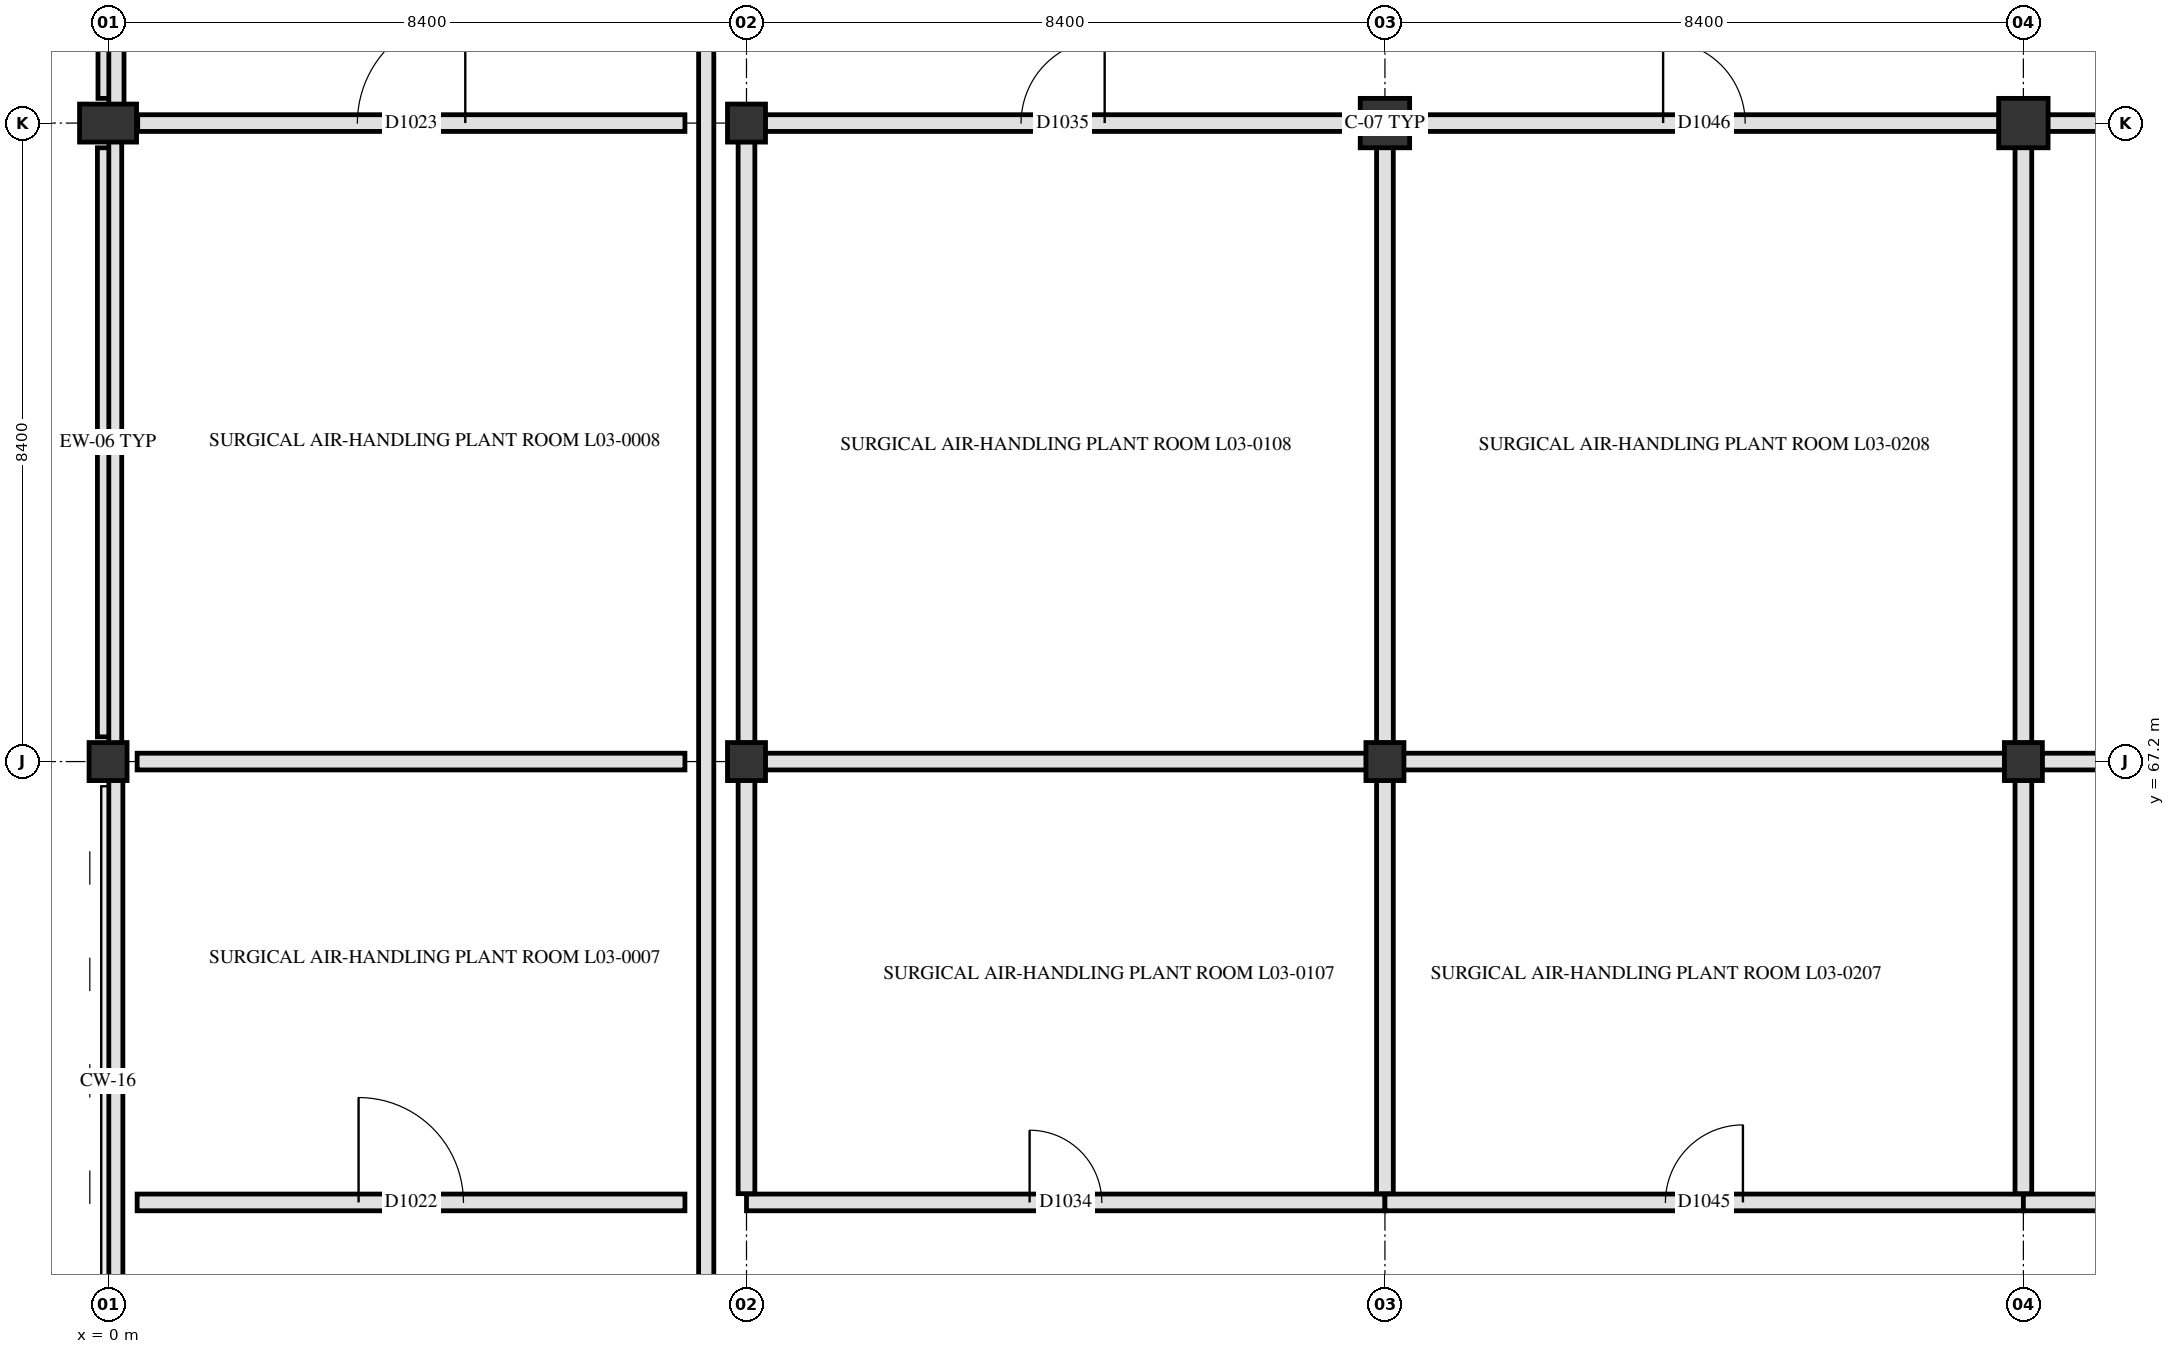
"""IFC4 building model, lengths in metres.
Left out: names, types, materials, properties, quantities, classifications, styles, units other than length and angle.
Written with IfcOpenShell. Run it as: python <this file> out.ifc"""

import sys

from ifc_helpers import new_model, si_unit, direction, frame, frame_2d, origin, origin_2d, place, context, subcontext, project, spatial, rectangle, circle, extrude, element, fill, save


model = new_model("IFC4")
c1 = context("Model", 3, precision=1e-05, world=origin(), true_north=direction((0.0, 1.0)))
c2 = subcontext(c1, "Body", "Model", "MODEL_VIEW")
j1 = project(units=[si_unit("LENGTHUNIT", "METRE"), si_unit("PLANEANGLEUNIT", "RADIAN")], contexts=[c1])
p1 = place(None, origin())
s1 = spatial("IfcSite", under=j1, at=p1, CompositionType="ELEMENT")
p2 = place(p1, origin())
s2 = spatial("IfcBuilding", under=s1, at=p2, CompositionType="ELEMENT")
p3 = place(p2, frame((0.0, 0.0, 14.4)))
s3 = spatial("IfcBuildingStorey", under=s2, at=p3, CompositionType="ELEMENT", Elevation=14.4)
p4 = place(p3, frame((0.0, 67.2, 0.0), z_axis=(0.0, 0.0, 1.0), x_axis=(1.0, 0.0, 0.0)))
e1 = element("IfcColumn", 1, at=p4, inside=s3, PredefinedType="COLUMN", context=c2, shape_type="SweptSolid", body=[
    extrude(rectangle(XDim=0.5, YDim=0.5, at=origin_2d()), origin(), (0.0, 0.0, 1.0), 4.2),
])
p5 = place(p3, frame((0.0, 75.6, 0.0), z_axis=(0.0, 0.0, 1.0), x_axis=(0.0, 1.0, 0.0)))
e2 = element("IfcColumn", 2, at=p5, inside=s3, PredefinedType="PILASTER", context=c2, shape_type="SweptSolid", body=[
    extrude(rectangle(XDim=0.5, YDim=0.75, at=origin_2d()), origin(), (0.0, 0.0, 1.0), 4.2),
])
for number, where, z_axis, x_axis in (
    (3, (8.4, 67.2, 0.0), (0.0, 0.0, 1.0), (1.0, 0.0, 0.0)),
    (4, (8.4, 75.6, 0.0), (0.0, 0.0, 1.0), (1.0, 0.0, 0.0)),
    (5, (16.8, 67.2, 0.0), (0.0, 0.0, 1.0), (1.0, 0.0, 0.0)),
):
    element("IfcColumn", number, at=place(p3, frame(where, z_axis=z_axis, x_axis=x_axis)), inside=s3, PredefinedType="COLUMN", context=c2, shape_type="SweptSolid", body=[
        extrude(rectangle(XDim=0.5, YDim=0.5, at=origin_2d()), origin(), (0.0, 0.0, 1.0), 4.2),
    ])
p6 = place(p3, frame((16.8, 75.6, 0.0), z_axis=(0.0, 0.0, 1.0), x_axis=(1.0, 0.0, 0.0)))
e6 = element("IfcColumn", 6, at=p6, inside=s3, PredefinedType="COLUMN", context=c2, shape_type="SweptSolid", body=[
    extrude(circle(Radius=0.325, at=origin_2d()), origin(), (0.0, 0.0, 1.0), 4.2),
])
p7 = place(p3, frame((25.2, 67.2, 0.0), z_axis=(0.0, 0.0, 1.0), x_axis=(1.0, 0.0, 0.0)))
e7 = element("IfcColumn", 7, at=p7, inside=s3, PredefinedType="COLUMN", context=c2, shape_type="SweptSolid", body=[
    extrude(rectangle(XDim=0.5, YDim=0.5, at=origin_2d()), origin(), (0.0, 0.0, 1.0), 4.2),
])
p8 = place(p3, frame((25.2, 75.6, 0.0), z_axis=(0.0, 0.0, 1.0), x_axis=(1.0, 0.0, 0.0)))
e8 = element("IfcColumn", 8, at=p8, inside=s3, PredefinedType="COLUMN", context=c2, shape_type="SweptSolid", body=[
    extrude(circle(Radius=0.325, at=origin_2d()), origin(), (0.0, 0.0, 1.0), 4.2),
])
p9 = place(p3, frame((0.0, 67.525, 0.0), z_axis=(0.0, 0.0, 1.0), x_axis=(0.0, 1.0, 0.0)))
e9 = element("IfcWall", 9, at=p9, inside=s3, PredefinedType="SOLIDWALL", context=c2, shape_type="SweptSolid", body=[
    extrude(rectangle(XDim=7.75, YDim=0.28, at=frame_2d((3.875, 0.0))), origin(), (0.0, 0.0, 1.0), 3.19),
])
p10 = place(p3, frame((0.0, 75.925, 0.0), z_axis=(0.0, 0.0, 1.0), x_axis=(0.0, 1.0, 0.0)))
e10 = element("IfcWall", 10, at=p10, inside=s3, PredefinedType="SOLIDWALL", context=c2, shape_type="SweptSolid", body=[
    extrude(rectangle(XDim=7.75, YDim=0.265, at=frame_2d((3.875, 0.0))), origin(), (0.0, 0.0, 1.0), 3.19),
])
p11 = place(p10, frame((0.938, 0.0, 0.85)))
e11 = element("IfcOpeningElement", 11, at=p11, cuts=e10, PredefinedType="OPENING", context=c2, shape_type="SweptSolid", body=[
    extrude(rectangle(XDim=2.0, YDim=1.66, at=frame_2d((1.0, 0.83))), frame((0.0, 0.142, 0.0), z_axis=(0.0, -1.0, 0.0), x_axis=(1.0, 0.0, 0.0)), (0.0, 0.0, 1.0), 0.285),
])
p12 = place(p10, frame((5.238, 0.0, 0.85)))
e12 = element("IfcOpeningElement", 12, at=p12, cuts=e10, PredefinedType="OPENING", context=c2, shape_type="SweptSolid", body=[
    extrude(rectangle(XDim=1.15, YDim=1.78, at=frame_2d((0.575, 0.89))), frame((0.0, 0.142, 0.0), z_axis=(0.0, -1.0, 0.0), x_axis=(1.0, 0.0, 0.0)), (0.0, 0.0, 1.0), 0.285),
])
p13 = place(p3, frame((7.87, 109.2, 4.18), z_axis=(0.0, 0.0, 1.0), x_axis=(0.0, -1.0, 0.0)))
e13 = element("IfcWall", 13, at=p13, inside=s3, PredefinedType="PARAPET", context=c2, shape_type="SweptSolid", body=[
    extrude(rectangle(XDim=50.4, YDim=0.2, at=frame_2d((25.2, 0.0))), origin(), (0.0, 0.0, 1.0), 1.17),
])
p14 = place(p3, frame((0.103, 58.8, 4.18), z_axis=(0.0, 0.0, 1.0), x_axis=(0.0, 1.0, 0.0)))
e14 = element("IfcWall", 14, at=p14, inside=s3, PredefinedType="PARAPET", context=c2, shape_type="SweptSolid", body=[
    extrude(rectangle(XDim=8.4, YDim=0.185, at=frame_2d((4.2, 0.0))), origin(), (0.0, 0.0, 1.0), 1.17),
])
p15 = place(p3, frame((0.095, 67.2, 4.18), z_axis=(0.0, 0.0, 1.0), x_axis=(0.0, 1.0, 0.0)))
e15 = element("IfcWall", 15, at=p15, inside=s3, PredefinedType="PARAPET", context=c2, shape_type="SweptSolid", body=[
    extrude(rectangle(XDim=8.4, YDim=0.17, at=frame_2d((4.2, 0.0))), origin(), (0.0, 0.0, 1.0), 1.17),
])
p16 = place(p3, frame((0.11, 75.6, 4.18), z_axis=(0.0, 0.0, 1.0), x_axis=(0.0, 1.0, 0.0)))
e16 = element("IfcWall", 16, at=p16, inside=s3, PredefinedType="PARAPET", context=c2, shape_type="SweptSolid", body=[
    extrude(rectangle(XDim=8.4, YDim=0.2, at=frame_2d((4.2, 0.0))), origin(), (0.0, 0.0, 1.0), 1.17),
])
p17 = place(p3, frame((0.383, 61.4, 0.0), z_axis=(0.0, 0.0, 1.0), x_axis=(1.0, 0.0, 0.0)))
e17 = element("IfcWall", 17, at=p17, inside=s3, PredefinedType="PARTITIONING", context=c2, shape_type="SweptSolid", body=[
    extrude(rectangle(XDim=7.208, YDim=0.22, at=frame_2d((3.604, 0.0))), origin(), (0.0, 0.0, 1.0), 3.89),
])
p18 = place(p17, frame((2.914, 0.0, 0.0)))
e18 = element("IfcOpeningElement", 18, at=p18, cuts=e17, PredefinedType="OPENING", context=c2, shape_type="SweptSolid", body=[
    extrude(rectangle(XDim=1.38, YDim=2.22, at=frame_2d((0.69, 1.11))), frame((0.0, 0.12, 0.0), z_axis=(0.0, -1.0, 0.0), x_axis=(1.0, 0.0, 0.0)), (0.0, 0.0, 1.0), 0.24),
])
p19 = place(p3, frame((8.4, 61.4, 0.0), z_axis=(0.0, 0.0, 1.0), x_axis=(1.0, 0.0, 0.0)))
e19 = element("IfcWall", 19, at=p19, inside=s3, PredefinedType="PARTITIONING", context=c2, shape_type="SweptSolid", body=[
    extrude(rectangle(XDim=8.4, YDim=0.22, at=frame_2d((4.2, 0.0))), origin(), (0.0, 0.0, 1.0), 3.33),
])
p20 = place(p19, frame((3.725, 0.0, 0.0)))
e20 = element("IfcOpeningElement", 20, at=p20, cuts=e19, PredefinedType="OPENING", context=c2, shape_type="SweptSolid", body=[
    extrude(rectangle(XDim=0.95, YDim=2.1, at=frame_2d((0.475, 1.05))), frame((0.0, 0.12, 0.0), z_axis=(0.0, -1.0, 0.0), x_axis=(1.0, 0.0, 0.0)), (0.0, 0.0, 1.0), 0.24),
])
p21 = place(p3, frame((16.8, 61.4, 0.0), z_axis=(0.0, 0.0, 1.0), x_axis=(1.0, 0.0, 0.0)))
e21 = element("IfcWall", 21, at=p21, inside=s3, PredefinedType="PARTITIONING", context=c2, shape_type="SweptSolid", body=[
    extrude(rectangle(XDim=8.4, YDim=0.22, at=frame_2d((4.2, 0.0))), origin(), (0.0, 0.0, 1.0), 3.33),
])
p22 = place(p21, frame((3.69, 0.0, 0.0)))
e22 = element("IfcOpeningElement", 22, at=p22, cuts=e21, PredefinedType="OPENING", context=c2, shape_type="SweptSolid", body=[
    extrude(rectangle(XDim=1.02, YDim=2.12, at=frame_2d((0.51, 1.06))), frame((0.0, 0.12, 0.0), z_axis=(0.0, -1.0, 0.0), x_axis=(1.0, 0.0, 0.0)), (0.0, 0.0, 1.0), 0.24),
])
p23 = place(p3, frame((25.2, 61.4, 0.0), z_axis=(0.0, 0.0, 1.0), x_axis=(1.0, 0.0, 0.0)))
e23 = element("IfcWall", 23, at=p23, inside=s3, PredefinedType="PARTITIONING", context=c2, shape_type="SweptSolid", body=[
    extrude(rectangle(XDim=8.4, YDim=0.22, at=frame_2d((4.2, 0.0))), origin(), (0.0, 0.0, 1.0), 3.33),
])
p24 = place(p23, frame((3.41, 0.0, 0.0)))
e24 = element("IfcOpeningElement", 24, at=p24, cuts=e23, PredefinedType="OPENING", context=c2, shape_type="SweptSolid", body=[
    extrude(rectangle(XDim=1.58, YDim=2.22, at=frame_2d((0.79, 1.11))), frame((0.0, 0.12, 0.0), z_axis=(0.0, -1.0, 0.0), x_axis=(1.0, 0.0, 0.0)), (0.0, 0.0, 1.0), 0.24),
])
p25 = place(p3, frame((0.383, 67.2, 0.0), z_axis=(0.0, 0.0, 1.0), x_axis=(1.0, 0.0, 0.0)))
e25 = element("IfcWall", 25, at=p25, inside=s3, PredefinedType="PARTITIONING", context=c2, shape_type="SweptSolid", body=[
    extrude(rectangle(XDim=7.208, YDim=0.22, at=frame_2d((3.604, 0.0))), origin(), (0.0, 0.0, 1.0), 3.29),
])
p26 = place(p3, frame((8.645, 67.2, 0.0), z_axis=(0.0, 0.0, 1.0), x_axis=(1.0, 0.0, 0.0)))
e26 = element("IfcWall", 26, at=p26, inside=s3, PredefinedType="PARTITIONING", context=c2, shape_type="SweptSolid", body=[
    extrude(rectangle(XDim=7.91, YDim=0.22, at=frame_2d((3.955, 0.0))), origin(), (0.0, 0.0, 1.0), 3.28),
])
p27 = place(p3, frame((17.045, 67.2, 0.0), z_axis=(0.0, 0.0, 1.0), x_axis=(1.0, 0.0, 0.0)))
e27 = element("IfcWall", 27, at=p27, inside=s3, PredefinedType="PARTITIONING", context=c2, shape_type="SweptSolid", body=[
    extrude(rectangle(XDim=7.91, YDim=0.22, at=frame_2d((3.955, 0.0))), origin(), (0.0, 0.0, 1.0), 3.28),
])
p28 = place(p3, frame((25.445, 67.2, 0.0), z_axis=(0.0, 0.0, 1.0), x_axis=(1.0, 0.0, 0.0)))
e28 = element("IfcWall", 28, at=p28, inside=s3, PredefinedType="PARTITIONING", context=c2, shape_type="SweptSolid", body=[
    extrude(rectangle(XDim=7.91, YDim=0.22, at=frame_2d((3.955, 0.0))), origin(), (0.0, 0.0, 1.0), 3.28),
])
p29 = place(p3, frame((0.39, 75.6, 0.0), z_axis=(0.0, 0.0, 1.0), x_axis=(1.0, 0.0, 0.0)))
e29 = element("IfcWall", 29, at=p29, inside=s3, PredefinedType="PARTITIONING", context=c2, shape_type="SweptSolid", body=[
    extrude(rectangle(XDim=7.2, YDim=0.22, at=frame_2d((3.6, 0.0))), origin(), (0.0, 0.0, 1.0), 3.29),
])
p30 = place(p29, frame((2.89, 0.0, 0.0)))
e30 = element("IfcOpeningElement", 30, at=p30, cuts=e29, PredefinedType="OPENING", context=c2, shape_type="SweptSolid", body=[
    extrude(rectangle(XDim=1.42, YDim=2.22, at=frame_2d((0.71, 1.11))), frame((0.0, 0.12, 0.0), z_axis=(0.0, -1.0, 0.0), x_axis=(1.0, 0.0, 0.0)), (0.0, 0.0, 1.0), 0.24),
])
p31 = place(p3, frame((8.645, 75.6, 0.0), z_axis=(0.0, 0.0, 1.0), x_axis=(1.0, 0.0, 0.0)))
e31 = element("IfcWall", 31, at=p31, inside=s3, PredefinedType="PARTITIONING", context=c2, shape_type="SweptSolid", body=[
    extrude(rectangle(XDim=7.835, YDim=0.22, at=frame_2d((3.917, 0.0))), origin(), (0.0, 0.0, 1.0), 3.28),
])
p32 = place(p31, frame((3.367, 0.0, 0.0)))
e32 = element("IfcOpeningElement", 32, at=p32, cuts=e31, PredefinedType="OPENING", context=c2, shape_type="SweptSolid", body=[
    extrude(rectangle(XDim=1.1, YDim=2.15, at=frame_2d((0.55, 1.075))), frame((0.0, 0.12, 0.0), z_axis=(0.0, -1.0, 0.0), x_axis=(1.0, 0.0, 0.0)), (0.0, 0.0, 1.0), 0.24),
])
p33 = place(p3, frame((17.12, 75.6, 0.0), z_axis=(0.0, 0.0, 1.0), x_axis=(1.0, 0.0, 0.0)))
e33 = element("IfcWall", 33, at=p33, inside=s3, PredefinedType="PARTITIONING", context=c2, shape_type="SweptSolid", body=[
    extrude(rectangle(XDim=7.76, YDim=0.22, at=frame_2d((3.88, 0.0))), origin(), (0.0, 0.0, 1.0), 3.28),
])
p34 = place(p33, frame((3.34, 0.0, 0.0)))
e34 = element("IfcOpeningElement", 34, at=p34, cuts=e33, PredefinedType="OPENING", context=c2, shape_type="SweptSolid", body=[
    extrude(rectangle(XDim=1.08, YDim=2.12, at=frame_2d((0.54, 1.06))), frame((0.0, 0.12, 0.0), z_axis=(0.0, -1.0, 0.0), x_axis=(1.0, 0.0, 0.0)), (0.0, 0.0, 1.0), 0.24),
])
p35 = place(p3, frame((25.52, 75.6, 0.0), z_axis=(0.0, 0.0, 1.0), x_axis=(1.0, 0.0, 0.0)))
e35 = element("IfcWall", 35, at=p35, inside=s3, PredefinedType="PARTITIONING", context=c2, shape_type="SweptSolid", body=[
    extrude(rectangle(XDim=7.76, YDim=0.22, at=frame_2d((3.88, 0.0))), origin(), (0.0, 0.0, 1.0), 3.28),
])
p36 = place(p35, frame((3.18, 0.0, 0.0)))
e36 = element("IfcOpeningElement", 36, at=p36, cuts=e35, PredefinedType="OPENING", context=c2, shape_type="SweptSolid", body=[
    extrude(rectangle(XDim=1.4, YDim=2.2, at=frame_2d((0.7, 1.1))), frame((0.0, 0.12, 0.0), z_axis=(0.0, -1.0, 0.0), x_axis=(1.0, 0.0, 0.0)), (0.0, 0.0, 1.0), 0.24),
])
p37 = place(p3, frame((8.4, 61.515, 0.0), z_axis=(0.0, 0.0, 1.0), x_axis=(0.0, 1.0, 0.0)))
e37 = element("IfcWall", 37, at=p37, inside=s3, PredefinedType="PARTITIONING", context=c2, shape_type="SweptSolid", body=[
    extrude(rectangle(XDim=5.44, YDim=0.22, at=frame_2d((2.72, 0.0))), origin(), (0.0, 0.0, 1.0), 3.33),
])
p38 = place(p3, frame((8.4, 67.445, 0.0), z_axis=(0.0, 0.0, 1.0), x_axis=(0.0, 1.0, 0.0)))
e38 = element("IfcWall", 38, at=p38, inside=s3, PredefinedType="PARTITIONING", context=c2, shape_type="SweptSolid", body=[
    extrude(rectangle(XDim=7.91, YDim=0.22, at=frame_2d((3.955, 0.0))), origin(), (0.0, 0.0, 1.0), 3.33),
])
p39 = place(p3, frame((16.8, 61.515, 0.0), z_axis=(0.0, 0.0, 1.0), x_axis=(0.0, 1.0, 0.0)))
e39 = element("IfcWall", 39, at=p39, inside=s3, PredefinedType="PARTITIONING", context=c2, shape_type="SweptSolid", body=[
    extrude(rectangle(XDim=5.44, YDim=0.22, at=frame_2d((2.72, 0.0))), origin(), (0.0, 0.0, 1.0), 3.33),
])
p40 = place(p3, frame((16.8, 67.445, 0.0), z_axis=(0.0, 0.0, 1.0), x_axis=(0.0, 1.0, 0.0)))
e40 = element("IfcWall", 40, at=p40, inside=s3, PredefinedType="PARTITIONING", context=c2, shape_type="SweptSolid", body=[
    extrude(rectangle(XDim=7.835, YDim=0.22, at=frame_2d((3.917, 0.0))), origin(), (0.0, 0.0, 1.0), 3.33),
])
p41 = place(p3, frame((25.2, 61.515, 0.0), z_axis=(0.0, 0.0, 1.0), x_axis=(0.0, 1.0, 0.0)))
e41 = element("IfcWall", 41, at=p41, inside=s3, PredefinedType="PARTITIONING", context=c2, shape_type="SweptSolid", body=[
    extrude(rectangle(XDim=5.44, YDim=0.22, at=frame_2d((2.72, 0.0))), origin(), (0.0, 0.0, 1.0), 3.33),
])
p42 = place(p3, frame((25.2, 67.445, 0.0), z_axis=(0.0, 0.0, 1.0), x_axis=(0.0, 1.0, 0.0)))
e42 = element("IfcWall", 42, at=p42, inside=s3, PredefinedType="PARTITIONING", context=c2, shape_type="SweptSolid", body=[
    extrude(rectangle(XDim=7.835, YDim=0.22, at=frame_2d((3.917, 0.0))), origin(), (0.0, 0.0, 1.0), 3.33),
])
p43 = place(p18, origin())
e43 = element("IfcDoor", 43, at=p43, inside=s3, OperationType="SINGLE_SWING_LEFT", PredefinedType="DOOR", context=c2, shape_type="SweptSolid", body=[
    extrude(rectangle(XDim=1.38, YDim=2.22, at=frame_2d((0.69, 1.11))), frame((0.0, 0.025, 0.0), z_axis=(0.0, -1.0, 0.0), x_axis=(1.0, 0.0, 0.0)), (0.0, 0.0, 1.0), 0.05),
])
fill(e18, e43)
p44 = place(p30, origin())
e44 = element("IfcDoor", 44, at=p44, inside=s3, OperationType="SINGLE_SWING_RIGHT", PredefinedType="DOOR", context=c2, shape_type="SweptSolid", body=[
    extrude(rectangle(XDim=1.42, YDim=2.22, at=frame_2d((0.71, 1.11))), frame((0.0, 0.025, 0.0), z_axis=(0.0, -1.0, 0.0), x_axis=(1.0, 0.0, 0.0)), (0.0, 0.0, 1.0), 0.05),
])
fill(e30, e44)
p45 = place(p20, origin())
e45 = element("IfcDoor", 45, at=p45, inside=s3, OperationType="SINGLE_SWING_LEFT", PredefinedType="DOOR", context=c2, shape_type="SweptSolid", body=[
    extrude(rectangle(XDim=0.95, YDim=2.1, at=frame_2d((0.475, 1.05))), frame((0.0, 0.025, 0.0), z_axis=(0.0, -1.0, 0.0), x_axis=(1.0, 0.0, 0.0)), (0.0, 0.0, 1.0), 0.05),
])
fill(e20, e45)
p46 = place(p32, origin())
e46 = element("IfcDoor", 46, at=p46, inside=s3, OperationType="SINGLE_SWING_RIGHT", PredefinedType="DOOR", context=c2, shape_type="SweptSolid", body=[
    extrude(rectangle(XDim=1.1, YDim=2.15, at=frame_2d((0.55, 1.075))), frame((0.0, 0.025, 0.0), z_axis=(0.0, -1.0, 0.0), x_axis=(1.0, 0.0, 0.0)), (0.0, 0.0, 1.0), 0.05),
])
fill(e32, e46)
p47 = place(p22, origin())
e47 = element("IfcDoor", 47, at=p47, inside=s3, OperationType="SINGLE_SWING_RIGHT", PredefinedType="DOOR", context=c2, shape_type="SweptSolid", body=[
    extrude(rectangle(XDim=1.02, YDim=2.12, at=frame_2d((0.51, 1.06))), frame((0.0, 0.025, 0.0), z_axis=(0.0, -1.0, 0.0), x_axis=(1.0, 0.0, 0.0)), (0.0, 0.0, 1.0), 0.05),
])
fill(e22, e47)
p48 = place(p34, origin())
e48 = element("IfcDoor", 48, at=p48, inside=s3, OperationType="SINGLE_SWING_LEFT", PredefinedType="DOOR", context=c2, shape_type="SweptSolid", body=[
    extrude(rectangle(XDim=1.08, YDim=2.12, at=frame_2d((0.54, 1.06))), frame((0.0, 0.025, 0.0), z_axis=(0.0, -1.0, 0.0), x_axis=(1.0, 0.0, 0.0)), (0.0, 0.0, 1.0), 0.05),
])
fill(e34, e48)
save(model, sys.argv[1])
